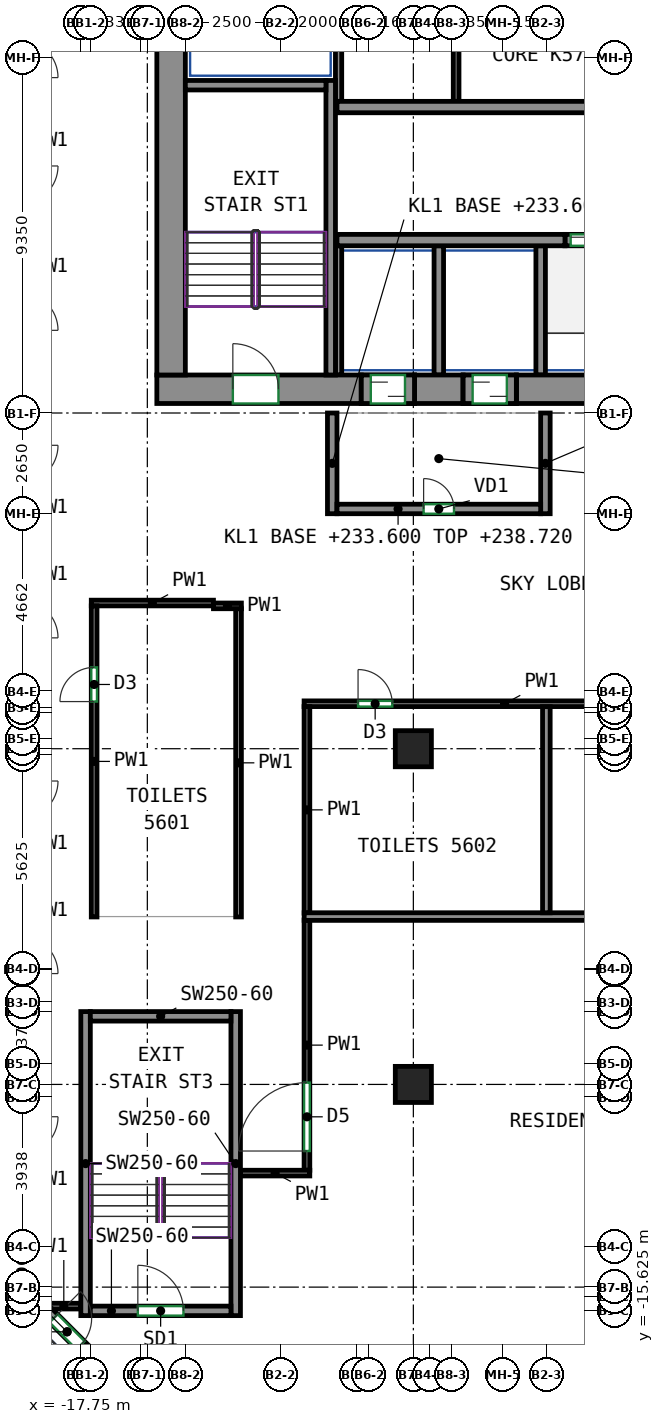
"""IFC4 building model, lengths in metres.
Left out: names, types, materials, properties, quantities, classifications, styles, units other than length and angle.
Written with IfcOpenShell. Run it as: python <this file> out.ifc"""

import sys

from ifc_helpers import new_model, si_unit, direction, frame, frame_2d, origin, origin_2d, place, context, subcontext, project, spatial, rectangle, extrude, source, transform, mapped, element, fill, save


model = new_model("IFC4")
c1 = context("Model", 3, precision=1e-05, world=origin(), true_north=direction((0.0, 1.0)))
c2 = subcontext(c1, "Body", "Model", "MODEL_VIEW")
j1 = project(units=[si_unit("LENGTHUNIT", "METRE"), si_unit("PLANEANGLEUNIT", "RADIAN")], contexts=[c1])
p1 = place(None, origin())
s1 = spatial("IfcSite", under=j1, at=p1, CompositionType="ELEMENT")
p2 = place(p1, origin())
s2 = spatial("IfcBuilding", under=s1, at=p2, CompositionType="ELEMENT")
p3 = place(p2, frame((0.0, 0.0, 233.6)))
s3 = spatial("IfcBuildingStorey", under=s2, at=p3, CompositionType="ELEMENT", Elevation=233.6)
m1 = source(origin(), c2, "Body", "SweptSolid", [
    extrude(rectangle(XDim=0.95, YDim=0.95, at=origin_2d()), origin(), (0.0, 0.0, 1.0), 5.12),
])
for number, where, z_axis, x_axis in (
    (1, (-9.0, -9.667, 0.0), (0.0, 0.0, 1.0), (1.0, 0.0, 0.0)),
    (2, (-9.0, -0.833, 0.0), (0.0, 0.0, 1.0), (1.0, 0.0, 0.0)),
):
    element("IfcColumn", number, at=place(p3, frame(where, z_axis=z_axis, x_axis=x_axis)), inside=s3, PredefinedType="COLUMN", context=c2, shape_type="MappedRepresentation", body=[
        mapped(m1, transform((0.0, 0.0, 0.0))),
    ])
m2 = source(origin(), c2, "Body", "SweptSolid", [
    extrude(rectangle(XDim=5.38, YDim=0.75, at=frame_2d((2.69, 0.0))), origin(), (0.0, 0.0, 1.0), 5.12),
])
p4 = place(p3, frame((-15.75, 8.625, 0.0), z_axis=(0.0, 0.0, 1.0), x_axis=(1.0, 0.0, 0.0)))
e3 = element("IfcWall", 3, at=p4, inside=s3, PredefinedType="SHEAR", context=c2, shape_type="MappedRepresentation", body=[
    mapped(m2, transform((0.0, 0.0, 0.0))),
])
p5 = place(p4, frame((2.0, 0.0, 0.0)))
e4 = element("IfcOpeningElement", 4, at=p5, cuts=e3, PredefinedType="OPENING", context=c2, shape_type="SweptSolid", body=[
    extrude(rectangle(XDim=1.2, YDim=2.1, at=frame_2d((0.6, 1.05))), frame((0.0, 0.385, 0.0), z_axis=(0.0, -1.0, 0.0), x_axis=(1.0, 0.0, 0.0)), (0.0, 0.0, 1.0), 0.77),
])
m3 = source(origin(), c2, "Body", "SweptSolid", [
    extrude(rectangle(XDim=1.28, YDim=0.75, at=frame_2d((0.64, 0.0))), origin(), (0.0, 0.0, 1.0), 5.12),
])
p6 = place(p3, frame((-8.97, 8.625, 0.0), z_axis=(0.0, 0.0, 1.0), x_axis=(1.0, 0.0, 0.0)))
e5 = element("IfcWall", 5, at=p6, inside=s3, PredefinedType="SHEAR", context=c2, shape_type="MappedRepresentation", body=[
    mapped(m3, transform((0.0, 0.0, 0.0))),
])
m4 = source(origin(), c2, "Body", "SweptSolid", [
    extrude(rectangle(XDim=14.18, YDim=0.75, at=frame_2d((7.09, 0.0))), origin(), (0.0, 0.0, 1.0), 5.12),
])
p7 = place(p3, frame((-6.29, 8.625, 0.0), z_axis=(0.0, 0.0, 1.0), x_axis=(1.0, 0.0, 0.0)))
e6 = element("IfcWall", 6, at=p7, inside=s3, PredefinedType="SHEAR", context=c2, shape_type="MappedRepresentation", body=[
    mapped(m4, transform((0.0, 0.0, 0.0))),
])
m5 = source(origin(), c2, "Body", "SweptSolid", [
    extrude(rectangle(XDim=12.0, YDim=0.75, at=frame_2d((6.0, 0.0))), origin(), (0.0, 0.0, 1.0), 5.12),
])
p8 = place(p3, frame((-15.375, 9.0, 0.0), z_axis=(0.0, 0.0, 1.0), x_axis=(0.0, 1.0, 0.0)))
e7 = element("IfcWall", 7, at=p8, inside=s3, PredefinedType="SHEAR", context=c2, shape_type="MappedRepresentation", body=[
    mapped(m5, transform((0.0, 0.0, 0.0))),
])
m6 = source(origin(), c2, "Body", "SweptSolid", [
    extrude(rectangle(XDim=7.75, YDim=0.25, at=frame_2d((3.875, 0.0))), origin(), (0.0, 0.0, 1.0), 5.12),
])
p9 = place(p3, frame((-11.175, 9.0, 0.0), z_axis=(0.0, 0.0, 1.0), x_axis=(0.0, 1.0, 0.0)))
e8 = element("IfcWall", 8, at=p9, inside=s3, PredefinedType="SHEAR", context=c2, shape_type="MappedRepresentation", body=[
    mapped(m6, transform((0.0, 0.0, 0.0))),
])
m7 = source(origin(), c2, "Body", "SweptSolid", [
    extrude(rectangle(XDim=3.7, YDim=0.25, at=frame_2d((1.85, 0.0))), origin(), (0.0, 0.0, 1.0), 5.12),
])
p10 = place(p3, frame((-15.0, 16.625, 0.0), z_axis=(0.0, 0.0, 1.0), x_axis=(1.0, 0.0, 0.0)))
e9 = element("IfcWall", 9, at=p10, inside=s3, PredefinedType="SHEAR", context=c2, shape_type="MappedRepresentation", body=[
    mapped(m7, transform((0.0, 0.0, 0.0))),
])
m8 = source(origin(), c2, "Body", "SweptSolid", [
    extrude(rectangle(XDim=8.0, YDim=0.25, at=frame_2d((4.0, 0.0))), origin(), (0.0, 0.0, 1.0), 5.12),
])
for number, where, z_axis, x_axis in (
    (10, (-17.625, -15.75, 0.0), (0.0, 0.0, 1.0), (0.0, 1.0, 0.0)),
    (11, (-13.675, -15.75, 0.0), (0.0, 0.0, 1.0), (0.0, 1.0, 0.0)),
):
    element("IfcWall", number, at=place(p3, frame(where, z_axis=z_axis, x_axis=x_axis)), inside=s3, PredefinedType="SHEAR", context=c2, shape_type="MappedRepresentation", body=[
        mapped(m8, transform((0.0, 0.0, 0.0))),
    ])
p11 = place(p3, frame((-17.5, -15.625, 0.0), z_axis=(0.0, 0.0, 1.0), x_axis=(1.0, 0.0, 0.0)))
e12 = element("IfcWall", 12, at=p11, inside=s3, PredefinedType="SHEAR", context=c2, shape_type="MappedRepresentation", body=[
    mapped(m7, transform((0.0, 0.0, 0.0))),
])
p12 = place(p11, frame((1.25, 0.0, 0.0)))
e13 = element("IfcOpeningElement", 13, at=p12, cuts=e12, PredefinedType="OPENING", context=c2, shape_type="SweptSolid", body=[
    extrude(rectangle(XDim=1.2, YDim=2.1, at=frame_2d((0.6, 1.05))), frame((0.0, 0.135, 0.0), z_axis=(0.0, -1.0, 0.0), x_axis=(1.0, 0.0, 0.0)), (0.0, 0.0, 1.0), 0.27),
])
p13 = place(p3, frame((-17.5, -7.875, 0.0), z_axis=(0.0, 0.0, 1.0), x_axis=(1.0, 0.0, 0.0)))
e14 = element("IfcWall", 14, at=p13, inside=s3, PredefinedType="SHEAR", context=c2, shape_type="MappedRepresentation", body=[
    mapped(m7, transform((0.0, 0.0, 0.0))),
])
m9 = source(origin(), c2, "Body", "SweptSolid", [
    extrude(rectangle(XDim=6.0, YDim=0.3, at=frame_2d((3.0, 0.0))), origin(), (0.0, 0.0, 1.0), 5.12),
])
p14 = place(p3, frame((-11.01, 12.55, 0.0), z_axis=(0.0, 0.0, 1.0), x_axis=(1.0, 0.0, 0.0)))
e15 = element("IfcWall", 15, at=p14, inside=s3, PredefinedType="SHEAR", context=c2, shape_type="MappedRepresentation", body=[
    mapped(m9, transform((0.0, 0.0, 0.0))),
])
m10 = source(origin(), c2, "Body", "SweptSolid", [
    extrude(rectangle(XDim=14.04, YDim=0.3, at=frame_2d((7.02, 0.0))), origin(), (0.0, 0.0, 1.0), 5.12),
])
p15 = place(p3, frame((-11.01, 16.05, 0.0), z_axis=(0.0, 0.0, 1.0), x_axis=(1.0, 0.0, 0.0)))
e16 = element("IfcWall", 16, at=p15, inside=s3, PredefinedType="SHEAR", context=c2, shape_type="MappedRepresentation", body=[
    mapped(m10, transform((0.0, 0.0, 0.0))),
])
m11 = source(origin(), c2, "Body", "SweptSolid", [
    extrude(rectangle(XDim=1.4, YDim=0.75, at=frame_2d((0.7, 0.0))), origin(), (0.0, 0.0, 1.0), 1.22),
])
p16 = place(p3, frame((-10.37, 8.625, 3.9), z_axis=(0.0, 0.0, 1.0), x_axis=(1.0, 0.0, 0.0)))
e17 = element("IfcWall", 17, at=p16, inside=s3, PredefinedType="SHEAR", context=c2, shape_type="MappedRepresentation", body=[
    mapped(m11, transform((0.0, 0.0, 0.0))),
])
m12 = source(origin(), c2, "Body", "SweptSolid", [
    extrude(rectangle(XDim=1.4, YDim=0.75, at=frame_2d((0.7, 0.0))), origin(), (0.0, 0.0, 1.0), 1.17),
])
p17 = place(p3, frame((-7.69, 8.625, 3.95), z_axis=(0.0, 0.0, 1.0), x_axis=(1.0, 0.0, 0.0)))
e18 = element("IfcWall", 18, at=p17, inside=s3, PredefinedType="SHEAR", context=c2, shape_type="MappedRepresentation", body=[
    mapped(m12, transform((0.0, 0.0, 0.0))),
])
m13 = source(origin(), c2, "Body", "SweptSolid", [
    extrude(rectangle(XDim=2.0, YDim=0.3, at=frame_2d((1.0, 0.0))), origin(), (0.0, 0.0, 1.0), 5.12),
])
p18 = place(p3, frame((-18.819, -15.469, 0.0), z_axis=(0.0, 0.0, 1.0), x_axis=(0.707045742145, -0.70716781496, 0.0)))
e19 = element("IfcWall", 19, at=p18, inside=s3, PredefinedType="SOLIDWALL", context=c2, shape_type="MappedRepresentation", body=[
    mapped(m13, transform((0.0, 0.0, 0.0))),
])
p19 = place(p18, frame((0.5, 0.0, 0.0)))
e20 = element("IfcOpeningElement", 20, at=p19, cuts=e19, PredefinedType="OPENING", context=c2, shape_type="SweptSolid", body=[
    extrude(rectangle(XDim=1.0, YDim=2.1, at=frame_2d((0.5, 1.05))), frame((0.0, 0.16, 0.0), z_axis=(0.0, -1.0, 0.0), x_axis=(1.0, 0.0, 0.0)), (0.0, 0.0, 1.0), 0.32),
])
m14 = source(origin(), c2, "Body", "SweptSolid", [
    extrude(rectangle(XDim=1.4, YDim=0.3, at=frame_2d((0.7, 0.0))), origin(), (0.0, 0.0, 1.0), 5.12),
])
p20 = place(p3, frame((-5.01, 12.55, 0.0), z_axis=(0.0, 0.0, 1.0), x_axis=(1.0, 0.0, 0.0)))
e21 = element("IfcWall", 21, at=p20, inside=s3, PredefinedType="PARTITIONING", context=c2, shape_type="MappedRepresentation", body=[
    mapped(m14, transform((0.0, 0.0, 0.0))),
])
p21 = place(p20, frame((0.15, 0.0, 0.0)))
e22 = element("IfcOpeningElement", 22, at=p21, cuts=e21, PredefinedType="OPENING", context=c2, shape_type="SweptSolid", body=[
    extrude(rectangle(XDim=1.1, YDim=2.1, at=frame_2d((0.55, 1.05))), frame((0.0, 0.16, 0.0), z_axis=(0.0, -1.0, 0.0), x_axis=(1.0, 0.0, 0.0)), (0.0, 0.0, 1.0), 0.32),
])
m15 = source(origin(), c2, "Body", "SweptSolid", [
    extrude(rectangle(XDim=2.65, YDim=0.25, at=frame_2d((1.325, 0.0))), origin(), (0.0, 0.0, 1.0), 4.57),
])
for number, where, z_axis, x_axis in (
    (23, (-11.135, 5.35, 0.0), (0.0, 0.0, 1.0), (0.0, 1.0, 0.0)),
    (24, (-5.525, 5.35, 0.0), (0.0, 0.0, 1.0), (0.0, 1.0, 0.0)),
):
    element("IfcWall", number, at=place(p3, frame(where, z_axis=z_axis, x_axis=x_axis)), inside=s3, PredefinedType="PARTITIONING", context=c2, shape_type="MappedRepresentation", body=[
        mapped(m15, transform((0.0, 0.0, 0.0))),
    ])
m16 = source(origin(), c2, "Body", "SweptSolid", [
    extrude(rectangle(XDim=5.36, YDim=0.25, at=frame_2d((2.68, 0.0))), origin(), (0.0, 0.0, 1.0), 5.12),
])
p22 = place(p3, frame((-11.01, 5.475, 0.0), z_axis=(0.0, 0.0, 1.0), x_axis=(1.0, 0.0, 0.0)))
e25 = element("IfcWall", 25, at=p22, inside=s3, PredefinedType="PARTITIONING", context=c2, shape_type="MappedRepresentation", body=[
    mapped(m16, transform((0.0, 0.0, 0.0))),
])
p23 = place(p22, frame((2.28, 0.0, 0.0)))
e26 = element("IfcOpeningElement", 26, at=p23, cuts=e25, PredefinedType="OPENING", context=c2, shape_type="SweptSolid", body=[
    extrude(rectangle(XDim=0.8, YDim=2.0, at=frame_2d((0.4, 1.0))), frame((0.0, 0.135, 0.0), z_axis=(0.0, -1.0, 0.0), x_axis=(1.0, 0.0, 0.0)), (0.0, 0.0, 1.0), 0.27),
])
m17 = source(origin(), c2, "Body", "SweptSolid", [
    extrude(rectangle(XDim=4.8, YDim=0.165, at=frame_2d((2.4, 0.0))), origin(), (0.0, 0.0, 1.0), 5.12),
])
p24 = place(p3, frame((-10.968, 16.2, 0.0), z_axis=(0.0, 0.0, 1.0), x_axis=(0.0, 1.0, 0.0)))
e27 = element("IfcWall", 27, at=p24, inside=s3, PredefinedType="PARTITIONING", context=c2, shape_type="MappedRepresentation", body=[
    mapped(m17, transform((0.0, 0.0, 0.0))),
])
m18 = source(origin(), c2, "Body", "SweptSolid", [
    extrude(rectangle(XDim=3.4, YDim=0.165, at=frame_2d((1.7, 0.0))), origin(), (0.0, 0.0, 1.0), 5.12),
])
p25 = place(p3, frame((-10.968, 9.0, 0.0), z_axis=(0.0, 0.0, 1.0), x_axis=(0.0, 1.0, 0.0)))
e28 = element("IfcWall", 28, at=p25, inside=s3, PredefinedType="PARTITIONING", context=c2, shape_type="MappedRepresentation", body=[
    mapped(m18, transform((0.0, 0.0, 0.0))),
])
m19 = source(origin(), c2, "Body", "SweptSolid", [
    extrude(rectangle(XDim=3.4, YDim=0.25, at=frame_2d((1.7, 0.0))), origin(), (0.0, 0.0, 1.0), 5.12),
])
for number, where, z_axis, x_axis in (
    (29, (-5.65, 9.0, 0.0), (0.0, 0.0, 1.0), (0.0, 1.0, 0.0)),
    (30, (-8.33, 9.0, 0.0), (0.0, 0.0, 1.0), (0.0, 1.0, 0.0)),
):
    element("IfcWall", number, at=place(p3, frame(where, z_axis=z_axis, x_axis=x_axis)), inside=s3, PredefinedType="PARTITIONING", context=c2, shape_type="MappedRepresentation", body=[
        mapped(m19, transform((0.0, 0.0, 0.0))),
    ])
m20 = source(origin(), c2, "Body", "SweptSolid", [
    extrude(rectangle(XDim=4.8, YDim=0.15, at=frame_2d((2.4, 0.0))), origin(), (0.0, 0.0, 1.0), 5.12),
])
p26 = place(p3, frame((-7.875, 16.2, 0.0), z_axis=(0.0, 0.0, 1.0), x_axis=(0.0, 1.0, 0.0)))
e31 = element("IfcWall", 31, at=p26, inside=s3, PredefinedType="PARTITIONING", context=c2, shape_type="MappedRepresentation", body=[
    mapped(m20, transform((0.0, 0.0, 0.0))),
])
m21 = source(origin(), c2, "Body", "SweptSolid", [
    extrude(rectangle(XDim=1.4, YDim=0.75, at=frame_2d((0.7, 0.0))), origin(), (0.0, 0.0, 1.0), 2.7),
])
p27 = place(p3, frame((-10.37, 8.625, 0.0), z_axis=(0.0, 0.0, 1.0), x_axis=(1.0, 0.0, 0.0)))
e32 = element("IfcWall", 32, at=p27, inside=s3, PredefinedType="PARTITIONING", context=c2, shape_type="MappedRepresentation", body=[
    mapped(m21, transform((0.0, 0.0, 0.0))),
])
p28 = place(p27, frame((0.25, 0.0, 0.0)))
e33 = element("IfcOpeningElement", 33, at=p28, cuts=e32, PredefinedType="OPENING", context=c2, shape_type="SweptSolid", body=[
    extrude(rectangle(XDim=0.9, YDim=2.1, at=frame_2d((0.45, 1.05))), frame((0.0, 0.385, 0.0), z_axis=(0.0, -1.0, 0.0), x_axis=(1.0, 0.0, 0.0)), (0.0, 0.0, 1.0), 0.77),
])
m22 = source(origin(), c2, "Body", "SweptSolid", [
    extrude(rectangle(XDim=1.4, YDim=0.75, at=frame_2d((0.7, 0.0))), origin(), (0.0, 0.0, 1.0), 2.7),
])
p29 = place(p3, frame((-7.69, 8.625, 0.0), z_axis=(0.0, 0.0, 1.0), x_axis=(1.0, 0.0, 0.0)))
e34 = element("IfcWall", 34, at=p29, inside=s3, PredefinedType="PARTITIONING", context=c2, shape_type="MappedRepresentation", body=[
    mapped(m22, transform((0.0, 0.0, 0.0))),
])
p30 = place(p29, frame((0.25, 0.0, 0.0)))
e35 = element("IfcOpeningElement", 35, at=p30, cuts=e34, PredefinedType="OPENING", context=c2, shape_type="SweptSolid", body=[
    extrude(rectangle(XDim=0.9, YDim=2.1, at=frame_2d((0.45, 1.05))), frame((0.0, 0.385, 0.0), z_axis=(0.0, -1.0, 0.0), x_axis=(1.0, 0.0, 0.0)), (0.0, 0.0, 1.0), 0.77),
])
p31 = place(p3, frame((-13.6, 2.85, 0.0), z_axis=(0.0, 0.0, 1.0), x_axis=(0.0, -1.0, 0.0)))
e36 = element("IfcWall", 36, at=p31, inside=s3, PredefinedType="PARTITIONING", context=c2, shape_type="SweptSolid", body=[
    extrude(rectangle(XDim=8.11, YDim=0.15, at=frame_2d((4.055, 0.0))), origin(), (0.0, 0.0, 1.0), 5.12),
])
p32 = place(p3, frame((-14.26, 2.925, 0.0), z_axis=(0.0, 0.0, 1.0), x_axis=(1.0, 0.0, 0.0)))
e37 = element("IfcWall", 37, at=p32, inside=s3, PredefinedType="PARTITIONING", context=c2, shape_type="SweptSolid", body=[
    extrude(rectangle(XDim=0.735, YDim=0.15, at=frame_2d((0.368, 0.0))), origin(), (0.0, 0.0, 1.0), 5.12),
])
p33 = place(p3, frame((-17.475, 3.0, 0.0), z_axis=(0.0, 0.0, 1.0), x_axis=(1.0, 0.0, 0.0)))
e38 = element("IfcWall", 38, at=p33, inside=s3, PredefinedType="PARTITIONING", context=c2, shape_type="SweptSolid", body=[
    extrude(rectangle(XDim=3.215, YDim=0.15, at=frame_2d((1.607, 0.0))), origin(), (0.0, 0.0, 1.0), 5.12),
])
p34 = place(p3, frame((-17.4, -5.26, 0.0), z_axis=(0.0, 0.0, 1.0), x_axis=(0.0, 1.0, 0.0)))
e39 = element("IfcWall", 39, at=p34, inside=s3, PredefinedType="PARTITIONING", context=c2, shape_type="SweptSolid", body=[
    extrude(rectangle(XDim=8.185, YDim=0.15, at=frame_2d((4.093, 0.0))), origin(), (0.0, 0.0, 1.0), 5.12),
])
p35 = place(p34, frame((5.667, 0.0, 0.0)))
e40 = element("IfcOpeningElement", 40, at=p35, cuts=e39, PredefinedType="OPENING", context=c2, shape_type="SweptSolid", body=[
    extrude(rectangle(XDim=0.9, YDim=2.1, at=frame_2d((0.45, 1.05))), frame((0.0, 0.085, 0.0), z_axis=(0.0, -1.0, 0.0), x_axis=(1.0, 0.0, 0.0)), (0.0, 0.0, 1.0), 0.17),
])
p36 = place(p3, frame((-11.875, 0.35, 0.0), z_axis=(0.0, 0.0, 1.0), x_axis=(1.0, 0.0, 0.0)))
e41 = element("IfcWall", 41, at=p36, inside=s3, PredefinedType="PARTITIONING", context=c2, shape_type="SweptSolid", body=[
    extrude(rectangle(XDim=10.55, YDim=0.15, at=frame_2d((5.275, 0.0))), origin(), (0.0, 0.0, 1.0), 5.12),
])
p37 = place(p36, frame((1.42, 0.0, 0.0)))
e42 = element("IfcOpeningElement", 42, at=p37, cuts=e41, PredefinedType="OPENING", context=c2, shape_type="SweptSolid", body=[
    extrude(rectangle(XDim=0.9, YDim=2.1, at=frame_2d((0.45, 1.05))), frame((0.0, 0.085, 0.0), z_axis=(0.0, -1.0, 0.0), x_axis=(1.0, 0.0, 0.0)), (0.0, 0.0, 1.0), 0.17),
])
p38 = place(p3, frame((-11.8, -5.16, 0.0), z_axis=(0.0, 0.0, 1.0), x_axis=(0.0, 1.0, 0.0)))
e43 = element("IfcWall", 43, at=p38, inside=s3, PredefinedType="PARTITIONING", context=c2, shape_type="SweptSolid", body=[
    extrude(rectangle(XDim=5.435, YDim=0.15, at=frame_2d((2.717, 0.0))), origin(), (0.0, 0.0, 1.0), 5.12),
])
p39 = place(p3, frame((-11.8, -11.925, 0.0), z_axis=(0.0, 0.0, 1.0), x_axis=(0.0, 1.0, 0.0)))
e44 = element("IfcWall", 44, at=p39, inside=s3, PredefinedType="PARTITIONING", context=c2, shape_type="SweptSolid", body=[
    extrude(rectangle(XDim=6.585, YDim=0.15, at=frame_2d((3.292, 0.0))), origin(), (0.0, 0.0, 1.0), 5.12),
])
p40 = place(p39, frame((0.506, 0.0, 0.0)))
e45 = element("IfcOpeningElement", 45, at=p40, cuts=e44, PredefinedType="OPENING", context=c2, shape_type="SweptSolid", body=[
    extrude(rectangle(XDim=1.8, YDim=2.1, at=frame_2d((0.9, 1.05))), frame((0.0, 0.085, 0.0), z_axis=(0.0, -1.0, 0.0), x_axis=(1.0, 0.0, 0.0)), (0.0, 0.0, 1.0), 0.17),
])
p41 = place(p3, frame((-13.549, -12.0, 0.0), z_axis=(0.0, 0.0, 1.0), x_axis=(1.0, 0.0, 0.0)))
e46 = element("IfcWall", 46, at=p41, inside=s3, PredefinedType="PARTITIONING", context=c2, shape_type="SweptSolid", body=[
    extrude(rectangle(XDim=1.824, YDim=0.15, at=frame_2d((0.912, 0.0))), origin(), (0.0, 0.0, 1.0), 5.12),
])
p42 = place(p3, frame((-18.646, -15.5, 0.0), z_axis=(0.0, 0.0, 1.0), x_axis=(1.0, 0.0, 0.0)))
e47 = element("IfcWall", 47, at=p42, inside=s3, PredefinedType="PARTITIONING", context=c2, shape_type="SweptSolid", body=[
    extrude(rectangle(XDim=0.896, YDim=0.15, at=frame_2d((0.448, 0.0))), origin(), (0.0, 0.0, 1.0), 5.12),
])
p43 = place(p3, frame((-11.873, -5.25, 0.0), z_axis=(0.0, 0.0, 1.0), x_axis=(1.0, 0.0, 0.0)))
e48 = element("IfcWall", 48, at=p43, inside=s3, PredefinedType="PARTITIONING", context=c2, shape_type="SweptSolid", body=[
    extrude(rectangle(XDim=20.473, YDim=0.2, at=frame_2d((10.237, 0.0))), origin(), (0.0, 0.0, 1.0), 5.12),
])
p44 = place(p3, frame((-5.5, -5.15, 0.0), z_axis=(0.0, 0.0, 1.0), x_axis=(0.0, 1.0, 0.0)))
e49 = element("IfcWall", 49, at=p44, inside=s3, PredefinedType="PARTITIONING", context=c2, shape_type="SweptSolid", body=[
    extrude(rectangle(XDim=5.423, YDim=0.2, at=frame_2d((2.711, 0.0))), origin(), (0.0, 0.0, 1.0), 5.12),
])
p45 = place(p19, origin())
e50 = element("IfcDoor", 50, at=p45, inside=s3, OperationType="SINGLE_SWING_LEFT", PredefinedType="DOOR", context=c2, shape_type="SweptSolid", body=[
    extrude(rectangle(XDim=1.0, YDim=2.1, at=frame_2d((0.5, 1.05))), frame((0.0, 0.025, 0.0), z_axis=(0.0, -1.0, 0.0), x_axis=(1.0, 0.0, 0.0)), (0.0, 0.0, 1.0), 0.05),
])
fill(e20, e50)
p46 = place(p23, origin())
e51 = element("IfcDoor", 51, at=p46, inside=s3, OperationType="SINGLE_SWING_LEFT", PredefinedType="DOOR", context=c2, shape_type="SweptSolid", body=[
    extrude(rectangle(XDim=0.8, YDim=2.0, at=frame_2d((0.4, 1.0))), frame((0.0, 0.025, 0.0), z_axis=(0.0, -1.0, 0.0), x_axis=(1.0, 0.0, 0.0)), (0.0, 0.0, 1.0), 0.05),
])
fill(e26, e51)
p47 = place(p28, origin())
e52 = element("IfcDoor", 52, at=p47, inside=s3, OperationType="SLIDING_TO_LEFT", PredefinedType="DOOR", context=c2, shape_type="SweptSolid", body=[
    extrude(rectangle(XDim=0.9, YDim=2.1, at=frame_2d((0.45, 1.05))), frame((0.0, 0.28, 0.0), z_axis=(0.0, -1.0, 0.0), x_axis=(1.0, 0.0, 0.0)), (0.0, 0.0, 1.0), 0.05),
])
fill(e33, e52)
p48 = place(p30, origin())
e53 = element("IfcDoor", 53, at=p48, inside=s3, OperationType="SLIDING_TO_RIGHT", PredefinedType="DOOR", context=c2, shape_type="SweptSolid", body=[
    extrude(rectangle(XDim=0.9, YDim=2.1, at=frame_2d((0.45, 1.05))), frame((0.0, 0.28, 0.0), z_axis=(0.0, -1.0, 0.0), x_axis=(1.0, 0.0, 0.0)), (0.0, 0.0, 1.0), 0.05),
])
fill(e35, e53)
p49 = place(p21, origin())
e54 = element("IfcDoor", 54, at=p49, inside=s3, OperationType="DOUBLE_DOOR_SLIDING", PredefinedType="DOOR", context=c2, shape_type="SweptSolid", body=[
    extrude(rectangle(XDim=1.1, YDim=2.1, at=frame_2d((0.55, 1.05))), frame((0.0, 0.025, 0.0), z_axis=(0.0, -1.0, 0.0), x_axis=(1.0, 0.0, 0.0)), (0.0, 0.0, 1.0), 0.05),
])
fill(e22, e54)
p50 = place(p5, origin())
e55 = element("IfcDoor", 55, at=p50, inside=s3, OperationType="DOUBLE_DOOR_SINGLE_SWING", PredefinedType="DOOR", context=c2, shape_type="SweptSolid", body=[
    extrude(rectangle(XDim=1.2, YDim=2.1, at=frame_2d((0.6, 1.05))), frame((0.0, 0.28, 0.0), z_axis=(0.0, -1.0, 0.0), x_axis=(1.0, 0.0, 0.0)), (0.0, 0.0, 1.0), 0.05),
])
fill(e4, e55)
p51 = place(p12, origin())
e56 = element("IfcDoor", 56, at=p51, inside=s3, OperationType="DOUBLE_DOOR_SINGLE_SWING", PredefinedType="DOOR", context=c2, shape_type="SweptSolid", body=[
    extrude(rectangle(XDim=1.2, YDim=2.1, at=frame_2d((0.6, 1.05))), frame((0.0, 0.025, 0.0), z_axis=(0.0, -1.0, 0.0), x_axis=(1.0, 0.0, 0.0)), (0.0, 0.0, 1.0), 0.05),
])
fill(e13, e56)
p52 = place(p40, origin())
e57 = element("IfcDoor", 57, at=p52, inside=s3, OperationType="DOUBLE_DOOR_SINGLE_SWING", PredefinedType="DOOR", context=c2, shape_type="SweptSolid", body=[
    extrude(rectangle(XDim=1.8, YDim=2.1, at=frame_2d((0.9, 1.05))), frame((0.0, 0.025, 0.0), z_axis=(0.0, -1.0, 0.0), x_axis=(1.0, 0.0, 0.0)), (0.0, 0.0, 1.0), 0.05),
])
fill(e45, e57)
p53 = place(p37, origin())
e58 = element("IfcDoor", 58, at=p53, inside=s3, OperationType="SINGLE_SWING_LEFT", PredefinedType="DOOR", context=c2, shape_type="SweptSolid", body=[
    extrude(rectangle(XDim=0.9, YDim=2.1, at=frame_2d((0.45, 1.05))), frame((0.0, 0.025, 0.0), z_axis=(0.0, -1.0, 0.0), x_axis=(1.0, 0.0, 0.0)), (0.0, 0.0, 1.0), 0.05),
])
fill(e42, e58)
p54 = place(p35, origin())
e59 = element("IfcDoor", 59, at=p54, inside=s3, OperationType="SINGLE_SWING_LEFT", PredefinedType="DOOR", context=c2, shape_type="SweptSolid", body=[
    extrude(rectangle(XDim=0.9, YDim=2.1, at=frame_2d((0.45, 1.05))), frame((0.0, 0.025, 0.0), z_axis=(0.0, -1.0, 0.0), x_axis=(1.0, 0.0, 0.0)), (0.0, 0.0, 1.0), 0.05),
])
fill(e40, e59)
save(model, sys.argv[1])
